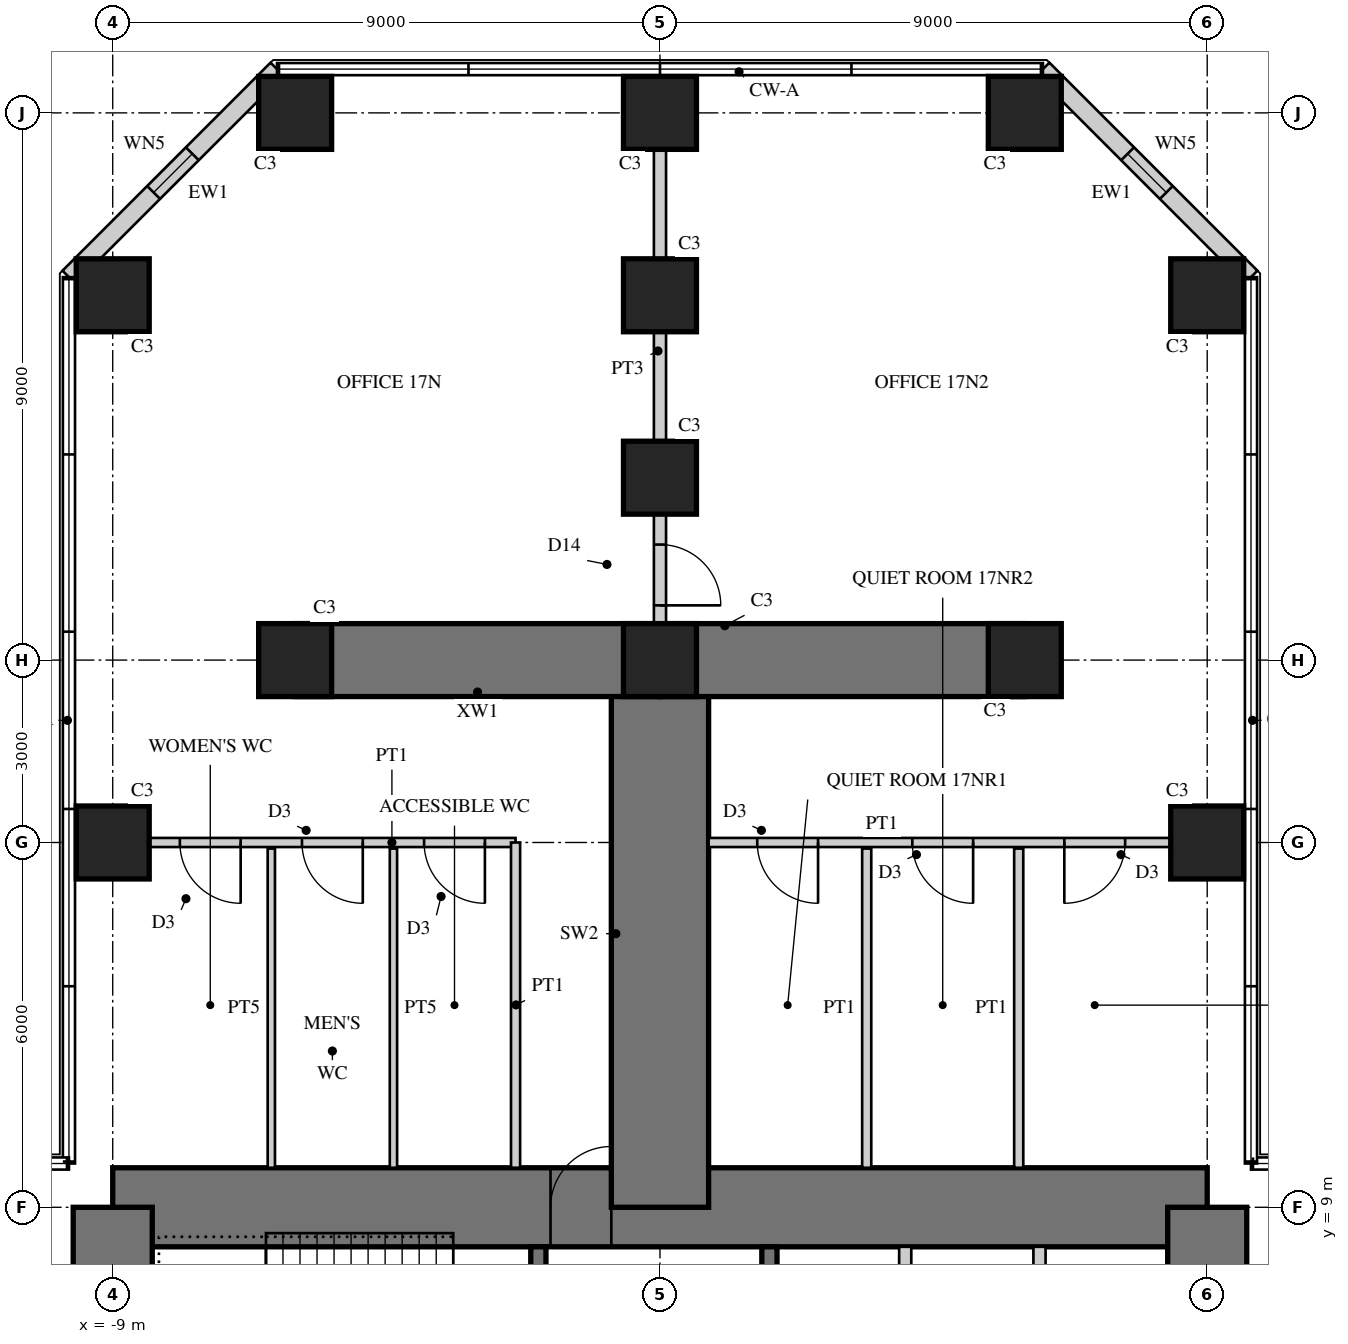
"""IFC4 building model, lengths in metres.
Left out: names, types, materials, properties, quantities, classifications, styles, units other than length and angle.
Written with IfcOpenShell. Run it as: python <this file> out.ifc"""

import sys

from ifc_helpers import new_model, si_unit, direction, frame, frame_2d, origin, origin_2d, place, context, subcontext, project, spatial, rectangle, hollow_rectangle, extrude, element, fill, save


model = new_model("IFC4")
c1 = context("Model", 3, precision=1e-05, world=origin(), true_north=direction((0.0, 1.0)))
c2 = subcontext(c1, "Body", "Model", "MODEL_VIEW")
j1 = project(units=[si_unit("LENGTHUNIT", "METRE"), si_unit("PLANEANGLEUNIT", "RADIAN")], contexts=[c1])
p1 = place(None, origin())
s1 = spatial("IfcSite", under=j1, at=p1, CompositionType="ELEMENT")
p2 = place(p1, origin())
s2 = spatial("IfcBuilding", under=s1, at=p2, CompositionType="ELEMENT")
p3 = place(p2, frame((0.0, 0.0, 71.5)))
s3 = spatial("IfcBuildingStorey", under=s2, at=p3, CompositionType="ELEMENT", Elevation=71.5)
p4 = place(p3, frame((9.0, 9.0, 0.0), z_axis=(0.0, 0.0, 1.0), x_axis=(-1.0, 0.0, 0.0)))
e1 = element("IfcWall", 1, at=p4, inside=s3, PredefinedType="SHEAR", context=c2, shape_type="SweptSolid", body=[
    extrude(rectangle(XDim=18.0, YDim=1.3, at=frame_2d((9.0, 0.0))), origin(), (0.0, 0.0, 1.0), 4.0),
])
p5 = place(p4, frame((9.8, 0.0, 0.0)))
e2 = element("IfcOpeningElement", 2, at=p5, cuts=e1, PredefinedType="OPENING", context=c2, shape_type="SweptSolid", body=[
    extrude(rectangle(XDim=1.0, YDim=2.4, at=frame_2d((0.5, 1.2))), frame((0.0, 0.66, 0.0), z_axis=(0.0, -1.0, 0.0), x_axis=(1.0, 0.0, 0.0)), (0.0, 0.0, 1.0), 1.32),
])
p6 = place(p3, frame((9.0, -9.0, 0.0), z_axis=(0.0, 0.0, 1.0), x_axis=(0.0, 1.0, 0.0)))
e3 = element("IfcWall", 3, at=p6, inside=s3, PredefinedType="SHEAR", context=c2, shape_type="SweptSolid", body=[
    extrude(rectangle(XDim=18.0, YDim=1.3, at=frame_2d((9.0, 0.0))), origin(), (0.0, 0.0, 1.0), 4.0),
])
p7 = place(p6, frame((9.8, 0.0, 0.0)))
e4 = element("IfcOpeningElement", 4, at=p7, cuts=e3, PredefinedType="OPENING", context=c2, shape_type="SweptSolid", body=[
    extrude(rectangle(XDim=1.0, YDim=2.4, at=frame_2d((0.5, 1.2))), frame((0.0, 0.66, 0.0), z_axis=(0.0, -1.0, 0.0), x_axis=(1.0, 0.0, 0.0)), (0.0, 0.0, 1.0), 1.32),
])
p8 = place(p3, frame((-9.0, 9.0, 0.0), z_axis=(0.0, 0.0, 1.0), x_axis=(0.0, -1.0, 0.0)))
e5 = element("IfcWall", 5, at=p8, inside=s3, PredefinedType="SHEAR", context=c2, shape_type="SweptSolid", body=[
    extrude(rectangle(XDim=18.0, YDim=1.3, at=frame_2d((9.0, 0.0))), origin(), (0.0, 0.0, 1.0), 4.0),
])
p9 = place(p8, frame((9.8, 0.0, 0.0)))
e6 = element("IfcOpeningElement", 6, at=p9, cuts=e5, PredefinedType="OPENING", context=c2, shape_type="SweptSolid", body=[
    extrude(rectangle(XDim=1.0, YDim=2.4, at=frame_2d((0.5, 1.2))), frame((0.0, 0.66, 0.0), z_axis=(0.0, -1.0, 0.0), x_axis=(1.0, 0.0, 0.0)), (0.0, 0.0, 1.0), 1.32),
])
p10 = place(p3, frame((1.8, 1.875, 0.0), z_axis=(0.0, 0.0, 1.0), x_axis=(0.0, 1.0, 0.0)))
e7 = element("IfcWall", 7, at=p10, inside=s3, PredefinedType="SHEAR", context=c2, shape_type="SweptSolid", body=[
    extrude(rectangle(XDim=6.475, YDim=0.25, at=frame_2d((3.238, 0.0))), origin(), (0.0, 0.0, 1.0), 4.0),
])
p11 = place(p10, frame((1.875, 0.0, 0.0)))
e8 = element("IfcOpeningElement", 8, at=p11, cuts=e7, PredefinedType="OPENING", context=c2, shape_type="SweptSolid", body=[
    extrude(rectangle(XDim=1.6, YDim=2.4, at=frame_2d((0.8, 1.2))), frame((0.0, 0.135, 0.0), z_axis=(0.0, -1.0, 0.0), x_axis=(1.0, 0.0, 0.0)), (0.0, 0.0, 1.0), 0.27),
])
for number, where, z_axis, x_axis in (
    (9, (4.033, 5.975, 0.0), (0.0, 0.0, 1.0), (0.0, 1.0, 0.0)),
    (10, (6.242, 5.975, 0.0), (0.0, 0.0, 1.0), (0.0, 1.0, 0.0)),
):
    element("IfcWall", number, at=place(p3, frame(where, z_axis=z_axis, x_axis=x_axis)), inside=s3, PredefinedType="PARTITIONING", context=c2, shape_type="SweptSolid", body=[
        extrude(rectangle(XDim=2.375, YDim=0.2, at=frame_2d((1.188, 0.0))), origin(), (0.0, 0.0, 1.0), 4.0),
    ])
p12 = place(p3, frame((-2.0, 1.675, 0.0), z_axis=(0.0, 0.0, 1.0), x_axis=(0.0, 1.0, 0.0)))
e11 = element("IfcWall", 11, at=p12, inside=s3, PredefinedType="SHEAR", context=c2, shape_type="SweptSolid", body=[
    extrude(rectangle(XDim=6.675, YDim=0.25, at=frame_2d((3.337, 0.0))), origin(), (0.0, 0.0, 1.0), 4.0),
])
p13 = place(p12, frame((0.725, 0.0, 0.0)))
e12 = element("IfcOpeningElement", 12, at=p13, cuts=e11, PredefinedType="OPENING", context=c2, shape_type="SweptSolid", body=[
    extrude(rectangle(XDim=1.0, YDim=2.1, at=frame_2d((0.5, 1.05))), frame((0.0, 0.135, 0.0), z_axis=(0.0, -1.0, 0.0), x_axis=(1.0, 0.0, 0.0)), (0.0, 0.0, 1.0), 0.27),
])
p14 = place(p3, frame((0.0, 9.0, 0.0), z_axis=(0.0, 0.0, 1.0), x_axis=(0.0, 1.0, 0.0)))
e13 = element("IfcWall", 13, at=p14, inside=s3, PredefinedType="SHEAR", context=c2, shape_type="SweptSolid", body=[
    extrude(rectangle(XDim=9.0, YDim=1.6, at=frame_2d((4.5, 0.0))), origin(), (0.0, 0.0, 1.0), 4.0),
])
for number, where, z_axis, x_axis in (
    (14, (0.0, 18.0, 0.0), (0.0, 0.0, 1.0), (-1.0, 0.0, 0.0)),
    (15, (0.0, 18.0, 0.0), (0.0, 0.0, 1.0), (1.0, 0.0, 0.0)),
):
    element("IfcWall", number, at=place(p3, frame(where, z_axis=z_axis, x_axis=x_axis)), inside=s3, PredefinedType="SHEAR", context=c2, shape_type="SweptSolid", body=[
        extrude(rectangle(XDim=6.0, YDim=1.2, at=frame_2d((3.0, 0.0))), origin(), (0.0, 0.0, 1.0), 4.0),
    ])
for number, where, z_axis, x_axis in (
    (16, (9.0, 15.0, 0.0), (0.0, 0.0, 1.0), (1.0, 0.0, 0.0)),
    (17, (9.0, 24.0, 0.0), (0.0, 0.0, 1.0), (1.0, 0.0, 0.0)),
    (18, (-9.0, 15.0, 0.0), (0.0, 0.0, 1.0), (1.0, 0.0, 0.0)),
    (19, (-9.0, 24.0, 0.0), (0.0, 0.0, 1.0), (1.0, 0.0, 0.0)),
    (20, (6.0, 27.0, 0.0), (0.0, 0.0, 1.0), (1.0, 0.0, 0.0)),
    (21, (0.0, 27.0, 0.0), (0.0, 0.0, 1.0), (1.0, 0.0, 0.0)),
    (22, (-6.0, 27.0, 0.0), (0.0, 0.0, 1.0), (1.0, 0.0, 0.0)),
    (23, (6.0, 18.0, 0.0), (0.0, 0.0, 1.0), (1.0, 0.0, 0.0)),
    (24, (0.0, 18.0, 0.0), (0.0, 0.0, 1.0), (1.0, 0.0, 0.0)),
    (25, (-6.0, 18.0, 0.0), (0.0, 0.0, 1.0), (1.0, 0.0, 0.0)),
    (26, (0.0, 21.0, 0.0), (0.0, 0.0, 1.0), (1.0, 0.0, 0.0)),
    (27, (0.0, 24.0, 0.0), (0.0, 0.0, 1.0), (1.0, 0.0, 0.0)),
):
    element("IfcColumn", number, at=place(p3, frame(where, z_axis=z_axis, x_axis=x_axis)), inside=s3, PredefinedType="COLUMN", context=c2, shape_type="SweptSolid", body=[
        extrude(rectangle(XDim=1.2, YDim=1.2, at=origin_2d()), origin(), (0.0, 0.0, 1.0), 4.0),
    ])
p15 = place(p3, frame((9.72, 24.298, 0.0), z_axis=(0.0, 0.0, 1.0), x_axis=(-0.707106781187, 0.707106781187, 0.0)))
e28 = element("IfcWall", 28, at=p15, inside=s3, PredefinedType="SOLIDWALL", context=c2, shape_type="SweptSolid", body=[
    extrude(rectangle(XDim=4.839, YDim=0.3, at=frame_2d((2.419, 0.0))), origin(), (0.0, 0.0, 1.0), 3.8),
])
p16 = place(p15, frame((1.969, 0.0, 0.3)))
e29 = element("IfcOpeningElement", 29, at=p16, cuts=e28, PredefinedType="OPENING", context=c2, shape_type="SweptSolid", body=[
    extrude(rectangle(XDim=0.9, YDim=2.4, at=frame_2d((0.45, 1.2))), frame((0.0, 0.16, 0.0), z_axis=(0.0, -1.0, 0.0), x_axis=(1.0, 0.0, 0.0)), (0.0, 0.0, 1.0), 0.32),
])
p17 = place(p3, frame((-6.298, 27.72, 0.0), z_axis=(0.0, 0.0, 1.0), x_axis=(-0.707106781187, -0.707106781187, 0.0)))
e30 = element("IfcWall", 30, at=p17, inside=s3, PredefinedType="SOLIDWALL", context=c2, shape_type="SweptSolid", body=[
    extrude(rectangle(XDim=4.839, YDim=0.3, at=frame_2d((2.419, 0.0))), origin(), (0.0, 0.0, 1.0), 3.8),
])
p18 = place(p17, frame((1.969, 0.0, 0.3)))
e31 = element("IfcOpeningElement", 31, at=p18, cuts=e30, PredefinedType="OPENING", context=c2, shape_type="SweptSolid", body=[
    extrude(rectangle(XDim=0.9, YDim=2.4, at=frame_2d((0.45, 1.2))), frame((0.0, 0.16, 0.0), z_axis=(0.0, -1.0, 0.0), x_axis=(1.0, 0.0, 0.0)), (0.0, 0.0, 1.0), 0.32),
])
p19 = place(p3, frame((-2.375, 15.0, 0.0), z_axis=(0.0, 0.0, 1.0), x_axis=(-1.0, 0.0, 0.0)))
e32 = element("IfcWall", 32, at=p19, inside=s3, PredefinedType="PARTITIONING", context=c2, shape_type="SweptSolid", body=[
    extrude(rectangle(XDim=6.025, YDim=0.15, at=frame_2d((3.012, 0.0))), origin(), (0.0, 0.0, 1.0), 2.95),
])
p20 = place(p19, frame((0.504, 0.0, 0.0)))
e33 = element("IfcOpeningElement", 33, at=p20, cuts=e32, PredefinedType="OPENING", context=c2, shape_type="SweptSolid", body=[
    extrude(rectangle(XDim=1.0, YDim=2.1, at=frame_2d((0.5, 1.05))), frame((0.0, 0.085, 0.0), z_axis=(0.0, -1.0, 0.0), x_axis=(1.0, 0.0, 0.0)), (0.0, 0.0, 1.0), 0.17),
])
p21 = place(p19, frame((2.512, 0.0, 0.0)))
e34 = element("IfcOpeningElement", 34, at=p21, cuts=e32, PredefinedType="OPENING", context=c2, shape_type="SweptSolid", body=[
    extrude(rectangle(XDim=1.0, YDim=2.1, at=frame_2d((0.5, 1.05))), frame((0.0, 0.085, 0.0), z_axis=(0.0, -1.0, 0.0), x_axis=(1.0, 0.0, 0.0)), (0.0, 0.0, 1.0), 0.17),
])
p22 = place(p19, frame((4.521, 0.0, 0.0)))
e35 = element("IfcOpeningElement", 35, at=p22, cuts=e32, PredefinedType="OPENING", context=c2, shape_type="SweptSolid", body=[
    extrude(rectangle(XDim=1.0, YDim=2.1, at=frame_2d((0.5, 1.05))), frame((0.0, 0.085, 0.0), z_axis=(0.0, -1.0, 0.0), x_axis=(1.0, 0.0, 0.0)), (0.0, 0.0, 1.0), 0.17),
])
p23 = place(p3, frame((-2.375, 9.65, 0.0), z_axis=(0.0, 0.0, 1.0), x_axis=(0.0, 1.0, 0.0)))
e36 = element("IfcWall", 36, at=p23, inside=s3, PredefinedType="PARTITIONING", context=c2, shape_type="SweptSolid", body=[
    extrude(rectangle(XDim=5.35, YDim=0.15, at=frame_2d((2.675, 0.0))), origin(), (0.0, 0.0, 1.0), 3.8),
])
for number, where, z_axis, x_axis in (
    (37, (-4.383, 9.65, 0.0), (0.0, 0.0, 1.0), (0.0, 1.0, 0.0)),
    (38, (-6.392, 9.65, 0.0), (0.0, 0.0, 1.0), (0.0, 1.0, 0.0)),
):
    element("IfcWall", number, at=place(p3, frame(where, z_axis=z_axis, x_axis=x_axis)), inside=s3, PredefinedType="PLUMBINGWALL", context=c2, shape_type="SweptSolid", body=[
        extrude(rectangle(XDim=5.25, YDim=0.12, at=frame_2d((2.625, 0.0))), origin(), (0.0, 0.0, 1.0), 3.8),
    ])
p24 = place(p3, frame((8.4, 15.0, 0.0), z_axis=(0.0, 0.0, 1.0), x_axis=(-1.0, 0.0, 0.0)))
e39 = element("IfcWall", 39, at=p24, inside=s3, PredefinedType="PARTITIONING", context=c2, shape_type="SweptSolid", body=[
    extrude(rectangle(XDim=7.6, YDim=0.15, at=frame_2d((3.8, 0.0))), origin(), (0.0, 0.0, 1.0), 2.95),
])
p25 = place(p24, frame((0.75, 0.0, 0.0)))
e40 = element("IfcOpeningElement", 40, at=p25, cuts=e39, PredefinedType="OPENING", context=c2, shape_type="SweptSolid", body=[
    extrude(rectangle(XDim=1.0, YDim=2.1, at=frame_2d((0.5, 1.05))), frame((0.0, 0.085, 0.0), z_axis=(0.0, -1.0, 0.0), x_axis=(1.0, 0.0, 0.0)), (0.0, 0.0, 1.0), 0.17),
])
p26 = place(p24, frame((3.25, 0.0, 0.0)))
e41 = element("IfcOpeningElement", 41, at=p26, cuts=e39, PredefinedType="OPENING", context=c2, shape_type="SweptSolid", body=[
    extrude(rectangle(XDim=1.0, YDim=2.1, at=frame_2d((0.5, 1.05))), frame((0.0, 0.085, 0.0), z_axis=(0.0, -1.0, 0.0), x_axis=(1.0, 0.0, 0.0)), (0.0, 0.0, 1.0), 0.17),
])
p27 = place(p24, frame((5.8, 0.0, 0.0)))
e42 = element("IfcOpeningElement", 42, at=p27, cuts=e39, PredefinedType="OPENING", context=c2, shape_type="SweptSolid", body=[
    extrude(rectangle(XDim=1.0, YDim=2.1, at=frame_2d((0.5, 1.05))), frame((0.0, 0.085, 0.0), z_axis=(0.0, -1.0, 0.0), x_axis=(1.0, 0.0, 0.0)), (0.0, 0.0, 1.0), 0.17),
])
p28 = place(p3, frame((3.4, 9.65, 0.0), z_axis=(0.0, 0.0, 1.0), x_axis=(0.0, 1.0, 0.0)))
e43 = element("IfcWall", 43, at=p28, inside=s3, PredefinedType="PARTITIONING", context=c2, shape_type="SweptSolid", body=[
    extrude(rectangle(XDim=5.25, YDim=0.15, at=frame_2d((2.625, 0.0))), origin(), (0.0, 0.0, 1.0), 3.8),
])
p29 = place(p3, frame((5.9, 9.65, 0.0), z_axis=(0.0, 0.0, 1.0), x_axis=(0.0, 1.0, 0.0)))
e44 = element("IfcWall", 44, at=p29, inside=s3, PredefinedType="PARTITIONING", context=c2, shape_type="SweptSolid", body=[
    extrude(rectangle(XDim=5.25, YDim=0.15, at=frame_2d((2.625, 0.0))), origin(), (0.0, 0.0, 1.0), 3.0),
])
p30 = place(p3, frame((0.0, 18.0, 0.0), z_axis=(0.0, 0.0, 1.0), x_axis=(0.0, 1.0, 0.0)))
e45 = element("IfcWall", 45, at=p30, inside=s3, PredefinedType="SOLIDWALL", context=c2, shape_type="SweptSolid", body=[
    extrude(rectangle(XDim=3.0, YDim=0.2, at=frame_2d((1.5, 0.0))), origin(), (0.0, 0.0, 1.0), 3.8),
])
p31 = place(p30, frame((0.9, 0.0, 0.0)))
e46 = element("IfcOpeningElement", 46, at=p31, cuts=e45, PredefinedType="OPENING", context=c2, shape_type="SweptSolid", body=[
    extrude(rectangle(XDim=1.0, YDim=2.2, at=frame_2d((0.5, 1.1))), frame((0.0, 0.11, 0.0), z_axis=(0.0, -1.0, 0.0), x_axis=(1.0, 0.0, 0.0)), (0.0, 0.0, 1.0), 0.22),
])
p32 = place(p3, frame((0.0, 21.0, 0.0), z_axis=(0.0, 0.0, 1.0), x_axis=(0.0, 1.0, 0.0)))
e47 = element("IfcWall", 47, at=p32, inside=s3, PredefinedType="SOLIDWALL", context=c2, shape_type="SweptSolid", body=[
    extrude(rectangle(XDim=6.0, YDim=0.2, at=frame_2d((3.0, 0.0))), origin(), (0.0, 0.0, 1.0), 2.9),
])
p33 = place(p16, origin())
e48 = element("IfcWindow", 48, at=p33, inside=s3, PartitioningType="SINGLE_PANEL", PredefinedType="WINDOW", context=c2, shape_type="SweptSolid", body=[
    extrude(hollow_rectangle(XDim=0.9, YDim=2.4, WallThickness=0.06, at=frame_2d((0.45, 1.2))), frame((0.0, 0.03, 0.0), z_axis=(0.0, -1.0, 0.0), x_axis=(1.0, 0.0, 0.0)), (0.0, 0.0, 1.0), 0.06),
    extrude(rectangle(XDim=0.779, YDim=2.279, at=frame_2d((0.45, 1.2))), frame((0.0, 0.03, 0.0), z_axis=(0.0, -1.0, 0.0), x_axis=(1.0, 0.0, 0.0)), (0.0, 0.0, 1.0), 0.06),
])
fill(e29, e48)
p34 = place(p18, origin())
e49 = element("IfcWindow", 49, at=p34, inside=s3, PartitioningType="SINGLE_PANEL", PredefinedType="WINDOW", context=c2, shape_type="SweptSolid", body=[
    extrude(hollow_rectangle(XDim=0.9, YDim=2.4, WallThickness=0.06, at=frame_2d((0.45, 1.2))), frame((0.0, 0.03, 0.0), z_axis=(0.0, -1.0, 0.0), x_axis=(1.0, 0.0, 0.0)), (0.0, 0.0, 1.0), 0.06),
    extrude(rectangle(XDim=0.779, YDim=2.279, at=frame_2d((0.45, 1.2))), frame((0.0, 0.03, 0.0), z_axis=(0.0, -1.0, 0.0), x_axis=(1.0, 0.0, 0.0)), (0.0, 0.0, 1.0), 0.06),
])
fill(e31, e49)
p35 = place(p20, origin())
e50 = element("IfcDoor", 50, at=p35, inside=s3, OperationType="SINGLE_SWING_LEFT", PredefinedType="DOOR", context=c2, shape_type="SweptSolid", body=[
    extrude(rectangle(XDim=1.0, YDim=2.1, at=frame_2d((0.5, 1.05))), frame((0.0, 0.025, 0.0), z_axis=(0.0, -1.0, 0.0), x_axis=(1.0, 0.0, 0.0)), (0.0, 0.0, 1.0), 0.05),
])
fill(e33, e50)
p36 = place(p21, origin())
e51 = element("IfcDoor", 51, at=p36, inside=s3, OperationType="SINGLE_SWING_LEFT", PredefinedType="DOOR", context=c2, shape_type="SweptSolid", body=[
    extrude(rectangle(XDim=1.0, YDim=2.1, at=frame_2d((0.5, 1.05))), frame((0.0, 0.025, 0.0), z_axis=(0.0, -1.0, 0.0), x_axis=(1.0, 0.0, 0.0)), (0.0, 0.0, 1.0), 0.05),
])
fill(e34, e51)
p37 = place(p22, origin())
e52 = element("IfcDoor", 52, at=p37, inside=s3, OperationType="SINGLE_SWING_LEFT", PredefinedType="DOOR", context=c2, shape_type="SweptSolid", body=[
    extrude(rectangle(XDim=1.0, YDim=2.1, at=frame_2d((0.5, 1.05))), frame((0.0, 0.025, 0.0), z_axis=(0.0, -1.0, 0.0), x_axis=(1.0, 0.0, 0.0)), (0.0, 0.0, 1.0), 0.05),
])
fill(e35, e52)
p38 = place(p25, origin())
e53 = element("IfcDoor", 53, at=p38, inside=s3, OperationType="SINGLE_SWING_RIGHT", PredefinedType="DOOR", context=c2, shape_type="SweptSolid", body=[
    extrude(rectangle(XDim=1.0, YDim=2.1, at=frame_2d((0.5, 1.05))), frame((0.0, 0.025, 0.0), z_axis=(0.0, -1.0, 0.0), x_axis=(1.0, 0.0, 0.0)), (0.0, 0.0, 1.0), 0.05),
])
fill(e40, e53)
p39 = place(p26, origin())
e54 = element("IfcDoor", 54, at=p39, inside=s3, OperationType="SINGLE_SWING_LEFT", PredefinedType="DOOR", context=c2, shape_type="SweptSolid", body=[
    extrude(rectangle(XDim=1.0, YDim=2.1, at=frame_2d((0.5, 1.05))), frame((0.0, 0.025, 0.0), z_axis=(0.0, -1.0, 0.0), x_axis=(1.0, 0.0, 0.0)), (0.0, 0.0, 1.0), 0.05),
])
fill(e41, e54)
p40 = place(p27, origin())
e55 = element("IfcDoor", 55, at=p40, inside=s3, OperationType="SINGLE_SWING_LEFT", PredefinedType="DOOR", context=c2, shape_type="SweptSolid", body=[
    extrude(rectangle(XDim=1.0, YDim=2.1, at=frame_2d((0.5, 1.05))), frame((0.0, 0.025, 0.0), z_axis=(0.0, -1.0, 0.0), x_axis=(1.0, 0.0, 0.0)), (0.0, 0.0, 1.0), 0.05),
])
fill(e42, e55)
p41 = place(p31, frame((1.0, 0.0, 0.0), z_axis=(0.0, 0.0, 1.0), x_axis=(-1.0, 0.0, 0.0)))
e56 = element("IfcDoor", 56, at=p41, inside=s3, OperationType="SINGLE_SWING_RIGHT", PredefinedType="DOOR", context=c2, shape_type="SweptSolid", body=[
    extrude(rectangle(XDim=1.0, YDim=2.2, at=frame_2d((0.5, 1.1))), frame((0.0, 0.025, 0.0), z_axis=(0.0, -1.0, 0.0), x_axis=(1.0, 0.0, 0.0)), (0.0, 0.0, 1.0), 0.05),
])
fill(e46, e56)
p42 = place(p5, frame((1.0, 0.0, 0.0), z_axis=(0.0, 0.0, 1.0), x_axis=(-1.0, 0.0, 0.0)))
e57 = element("IfcDoor", 57, at=p42, inside=s3, OperationType="SINGLE_SWING_RIGHT", PredefinedType="DOOR", context=c2, shape_type="SweptSolid", body=[
    extrude(rectangle(XDim=1.0, YDim=2.4, at=frame_2d((0.5, 1.2))), frame((0.0, -0.005, 0.0), z_axis=(0.0, -1.0, 0.0), x_axis=(1.0, 0.0, 0.0)), (0.0, 0.0, 1.0), 0.05),
])
fill(e2, e57)
save(model, sys.argv[1])
